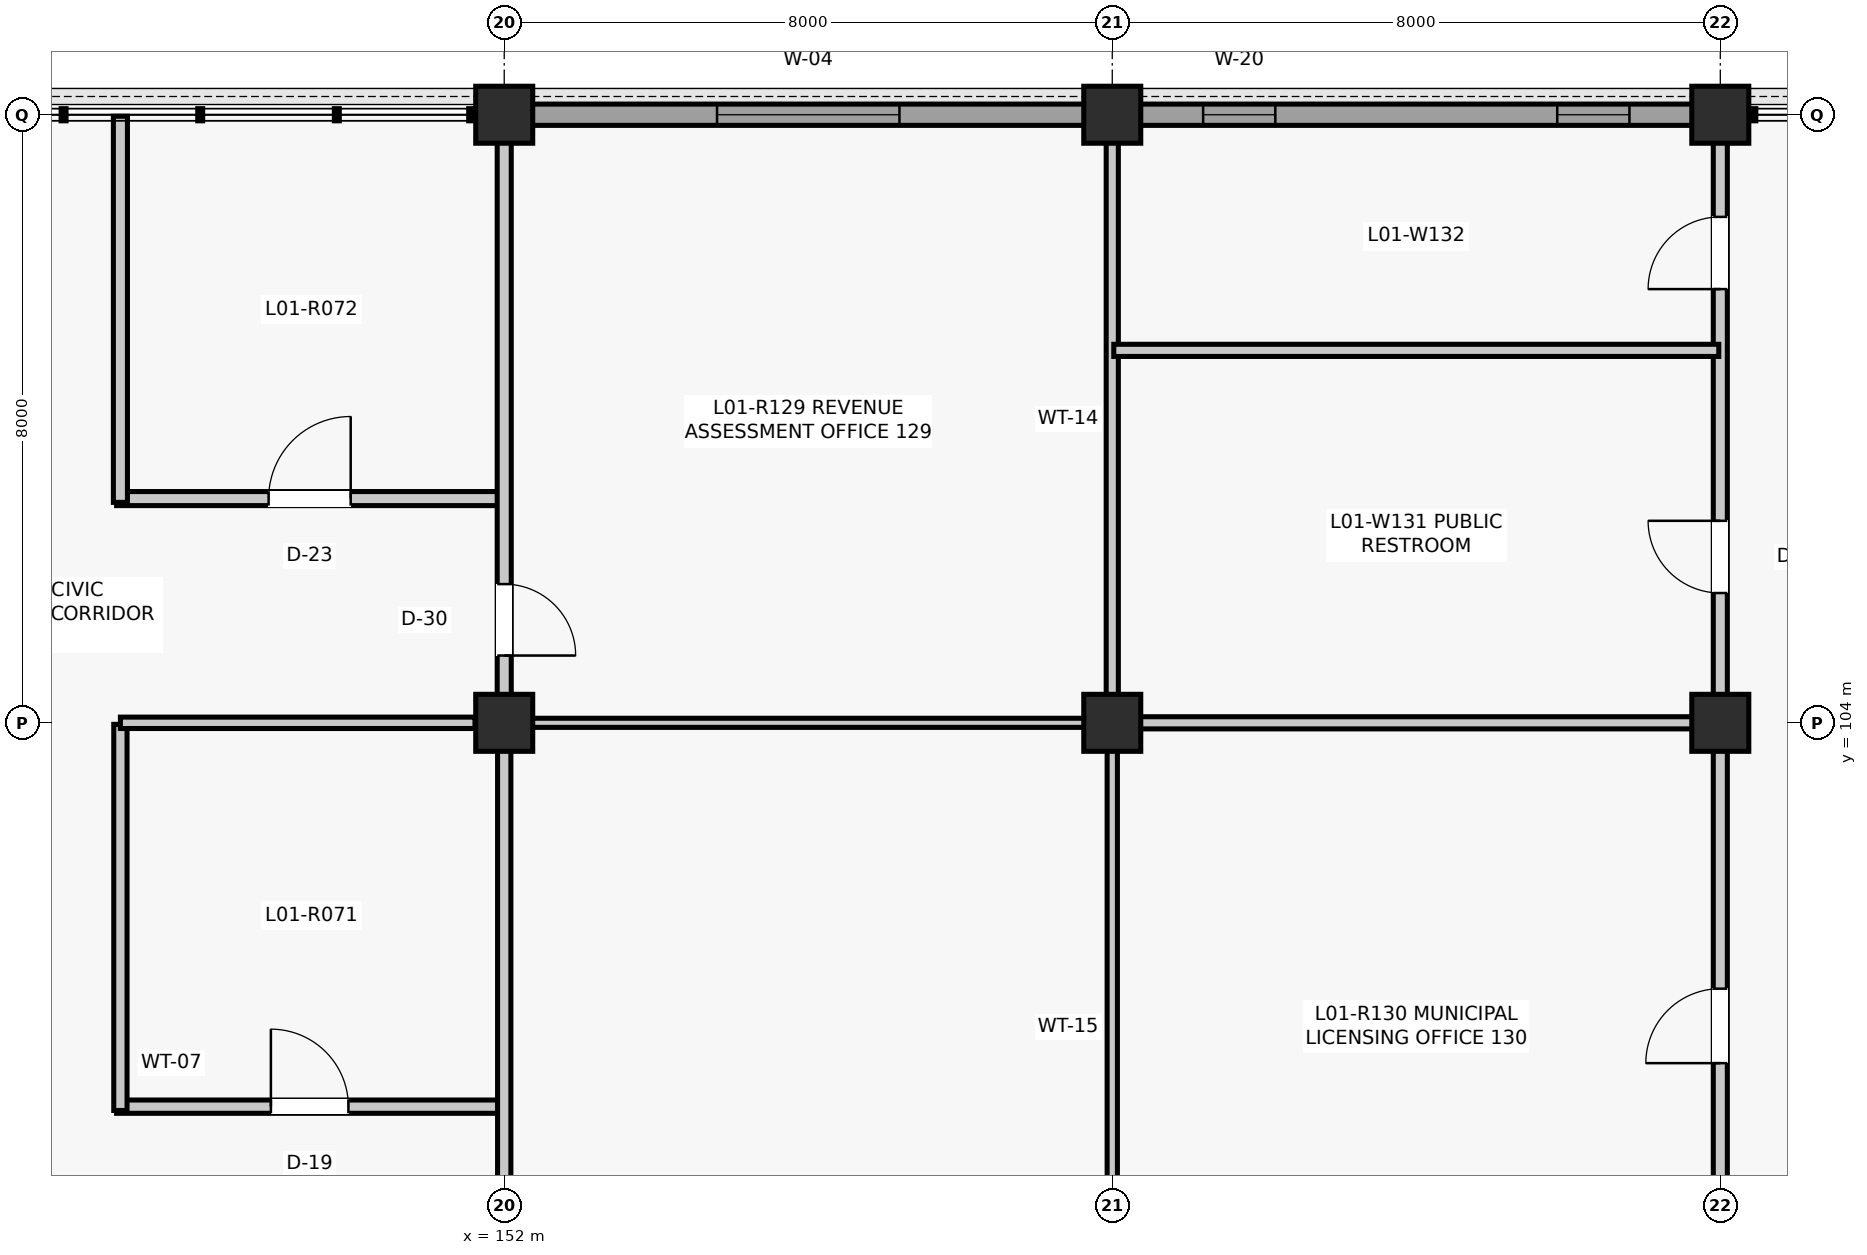
"""IFC4 building model, lengths in metres.
Left out: names, types, materials, properties, quantities, classifications, styles, units other than length and angle.
Written with IfcOpenShell. Run it as: python <this file> out.ifc"""

import sys

from ifc_helpers import new_model, si_unit, direction, frame, frame_2d, origin, origin_2d, place, context, subcontext, project, spatial, rectangle, extrude, element, fill, save


model = new_model("IFC4")
c1 = context("Model", 3, precision=1e-05, world=origin(), true_north=direction((0.0, 1.0)))
c2 = subcontext(c1, "Body", "Model", "MODEL_VIEW")
j1 = project(units=[si_unit("LENGTHUNIT", "METRE"), si_unit("PLANEANGLEUNIT", "RADIAN")], contexts=[c1])
p1 = place(None, origin())
s1 = spatial("IfcSite", under=j1, at=p1, CompositionType="ELEMENT")
p2 = place(p1, origin())
s2 = spatial("IfcBuilding", under=s1, at=p2, CompositionType="ELEMENT")
p3 = place(p2, frame((0.0, 0.0, 5.28)))
s3 = spatial("IfcBuildingStorey", under=s2, at=p3, CompositionType="ELEMENT", Elevation=5.28)
for number, where, z_axis, x_axis in (
    (1, (152.0, 104.0, 0.0), (0.0, 0.0, 1.0), (1.0, 0.0, 0.0)),
    (2, (152.0, 112.0, 0.0), (0.0, 0.0, 1.0), (1.0, 0.0, 0.0)),
    (3, (160.0, 104.0, 0.0), (0.0, 0.0, 1.0), (1.0, 0.0, 0.0)),
    (4, (160.0, 112.0, 0.0), (0.0, 0.0, 1.0), (1.0, 0.0, 0.0)),
    (5, (168.0, 104.0, 0.0), (0.0, 0.0, 1.0), (1.0, 0.0, 0.0)),
    (6, (168.0, 112.0, 0.0), (0.0, 0.0, 1.0), (1.0, 0.0, 0.0)),
):
    element("IfcColumn", number, at=place(p3, frame(where, z_axis=z_axis, x_axis=x_axis)), inside=s3, PredefinedType="COLUMN", context=c2, shape_type="SweptSolid", body=[
        extrude(rectangle(XDim=0.75, YDim=0.75, at=origin_2d()), origin(), (0.0, 0.0, 1.0), 4.62),
    ])
p4 = place(p3, frame((152.36, 112.0, 0.0), z_axis=(0.0, 0.0, 1.0), x_axis=(1.0, 0.0, 0.0)))
e7 = element("IfcWall", 7, at=p4, inside=s3, PredefinedType="SOLIDWALL", context=c2, shape_type="SweptSolid", body=[
    extrude(rectangle(XDim=7.28, YDim=0.28, at=frame_2d((3.64, 0.0))), origin(), (0.0, 0.0, 1.0), 3.914),
])
p5 = place(p4, frame((2.44, 0.0, 0.9)))
e8 = element("IfcOpeningElement", 8, at=p5, cuts=e7, PredefinedType="OPENING", context=c2, shape_type="SweptSolid", body=[
    extrude(rectangle(XDim=2.4, YDim=2.4, at=frame_2d((1.2, 1.2))), frame((0.0, 0.15, 0.0), z_axis=(0.0, -1.0, 0.0), x_axis=(1.0, 0.0, 0.0)), (0.0, 0.0, 1.0), 0.3),
])
p6 = place(p3, frame((160.36, 112.0, 0.0), z_axis=(0.0, 0.0, 1.0), x_axis=(1.0, 0.0, 0.0)))
e9 = element("IfcWall", 9, at=p6, inside=s3, PredefinedType="SOLIDWALL", context=c2, shape_type="SweptSolid", body=[
    extrude(rectangle(XDim=7.28, YDim=0.28, at=frame_2d((3.64, 0.0))), origin(), (0.0, 0.0, 1.0), 3.977),
])
p7 = place(p6, frame((0.835, 0.0, 1.2)))
e10 = element("IfcOpeningElement", 10, at=p7, cuts=e9, PredefinedType="OPENING", context=c2, shape_type="SweptSolid", body=[
    extrude(rectangle(XDim=0.95, YDim=1.4, at=frame_2d((0.475, 0.7))), frame((0.0, 0.15, 0.0), z_axis=(0.0, -1.0, 0.0), x_axis=(1.0, 0.0, 0.0)), (0.0, 0.0, 1.0), 0.3),
])
p8 = place(p6, frame((5.495, 0.0, 1.2)))
e11 = element("IfcOpeningElement", 11, at=p8, cuts=e9, PredefinedType="OPENING", context=c2, shape_type="SweptSolid", body=[
    extrude(rectangle(XDim=0.95, YDim=1.4, at=frame_2d((0.475, 0.7))), frame((0.0, 0.15, 0.0), z_axis=(0.0, -1.0, 0.0), x_axis=(1.0, 0.0, 0.0)), (0.0, 0.0, 1.0), 0.3),
])
p9 = place(p3, frame((146.9, 98.95, 0.0), z_axis=(0.0, 0.0, 1.0), x_axis=(1.0, 0.0, 0.0)))
e12 = element("IfcWall", 12, at=p9, inside=s3, PredefinedType="PARTITIONING", context=c2, shape_type="SweptSolid", body=[
    extrude(rectangle(XDim=5.08, YDim=0.175, at=frame_2d((2.54, 0.0))), origin(), (0.0, 0.0, 1.0), 3.851),
])
p10 = place(p9, frame((2.03, 0.0, 0.0)))
e13 = element("IfcOpeningElement", 13, at=p10, cuts=e12, PredefinedType="OPENING", context=c2, shape_type="SweptSolid", body=[
    extrude(rectangle(XDim=1.02, YDim=2.2, at=frame_2d((0.51, 1.1))), frame((0.0, 0.097, 0.0), z_axis=(0.0, -1.0, 0.0), x_axis=(1.0, 0.0, 0.0)), (0.0, 0.0, 1.0), 0.195),
])
p11 = place(p3, frame((146.95, 98.9, 0.0), z_axis=(0.0, 0.0, 1.0), x_axis=(0.0, 1.0, 0.0)))
e14 = element("IfcWall", 14, at=p11, inside=s3, PredefinedType="PARTITIONING", context=c2, shape_type="SweptSolid", body=[
    extrude(rectangle(XDim=5.08, YDim=0.175, at=frame_2d((2.54, 0.0))), origin(), (0.0, 0.0, 1.0), 3.781),
])
p12 = place(p3, frame((146.95, 104.0, 0.0), z_axis=(0.0, 0.0, 1.0), x_axis=(1.0, 0.0, 0.0)))
e15 = element("IfcWall", 15, at=p12, inside=s3, PredefinedType="PARTITIONING", context=c2, shape_type="SweptSolid", body=[
    extrude(rectangle(XDim=4.665, YDim=0.15, at=frame_2d((2.333, 0.0))), origin(), (0.0, 0.0, 1.0), 3.781),
])
p13 = place(p3, frame((146.9, 106.95, 0.0), z_axis=(0.0, 0.0, 1.0), x_axis=(1.0, 0.0, 0.0)))
e16 = element("IfcWall", 16, at=p13, inside=s3, PredefinedType="PARTITIONING", context=c2, shape_type="SweptSolid", body=[
    extrude(rectangle(XDim=5.08, YDim=0.185, at=frame_2d((2.54, 0.0))), origin(), (0.0, 0.0, 1.0), 3.787),
])
p14 = place(p13, frame((2.0, 0.0, 0.0)))
e17 = element("IfcOpeningElement", 17, at=p14, cuts=e16, PredefinedType="OPENING", context=c2, shape_type="SweptSolid", body=[
    extrude(rectangle(XDim=1.08, YDim=2.2, at=frame_2d((0.54, 1.1))), frame((0.0, 0.103, 0.0), z_axis=(0.0, -1.0, 0.0), x_axis=(1.0, 0.0, 0.0)), (0.0, 0.0, 1.0), 0.205),
])
p15 = place(p3, frame((146.95, 106.9, 0.0), z_axis=(0.0, 0.0, 1.0), x_axis=(0.0, 1.0, 0.0)))
e18 = element("IfcWall", 18, at=p15, inside=s3, PredefinedType="PARTITIONING", context=c2, shape_type="SweptSolid", body=[
    extrude(rectangle(XDim=5.08, YDim=0.185, at=frame_2d((2.54, 0.0))), origin(), (0.0, 0.0, 1.0), 3.968),
])
p16 = place(p3, frame((152.0, 96.365, 0.0), z_axis=(0.0, 0.0, 1.0), x_axis=(0.0, 1.0, 0.0)))
e19 = element("IfcWall", 19, at=p16, inside=s3, PredefinedType="PARTITIONING", context=c2, shape_type="SweptSolid", body=[
    extrude(rectangle(XDim=7.27, YDim=0.175, at=frame_2d((3.635, 0.0))), origin(), (0.0, 0.0, 1.0), 3.851),
])
p17 = place(p16, frame((0.52, 0.0, 0.0)))
e20 = element("IfcOpeningElement", 20, at=p17, cuts=e19, PredefinedType="OPENING", context=c2, shape_type="SweptSolid", body=[
    extrude(rectangle(XDim=0.94, YDim=2.12, at=frame_2d((0.47, 1.06))), frame((0.0, 0.097, 0.0), z_axis=(0.0, -1.0, 0.0), x_axis=(1.0, 0.0, 0.0)), (0.0, 0.0, 1.0), 0.195),
])
p18 = place(p3, frame((152.0, 104.365, 0.0), z_axis=(0.0, 0.0, 1.0), x_axis=(0.0, 1.0, 0.0)))
e21 = element("IfcWall", 21, at=p18, inside=s3, PredefinedType="PARTITIONING", context=c2, shape_type="SweptSolid", body=[
    extrude(rectangle(XDim=7.27, YDim=0.185, at=frame_2d((3.635, 0.0))), origin(), (0.0, 0.0, 1.0), 3.787),
])
p19 = place(p18, frame((0.52, 0.0, 0.0)))
e22 = element("IfcOpeningElement", 22, at=p19, cuts=e21, PredefinedType="OPENING", context=c2, shape_type="SweptSolid", body=[
    extrude(rectangle(XDim=0.94, YDim=2.12, at=frame_2d((0.47, 1.06))), frame((0.0, 0.103, 0.0), z_axis=(0.0, -1.0, 0.0), x_axis=(1.0, 0.0, 0.0)), (0.0, 0.0, 1.0), 0.205),
])
p20 = place(p3, frame((160.0, 96.39, 0.0), z_axis=(0.0, 0.0, 1.0), x_axis=(0.0, 1.0, 0.0)))
e23 = element("IfcWall", 23, at=p20, inside=s3, PredefinedType="PARTITIONING", context=c2, shape_type="SweptSolid", body=[
    extrude(rectangle(XDim=7.245, YDim=0.135, at=frame_2d((3.623, 0.0))), origin(), (0.0, 0.0, 1.0), 3.787),
])
p21 = place(p3, frame((152.365, 104.0, 0.0), z_axis=(0.0, 0.0, 1.0), x_axis=(1.0, 0.0, 0.0)))
e24 = element("IfcWall", 24, at=p21, inside=s3, PredefinedType="PARTITIONING", context=c2, shape_type="SweptSolid", body=[
    extrude(rectangle(XDim=7.27, YDim=0.12, at=frame_2d((3.635, 0.0))), origin(), (0.0, 0.0, 1.0), 3.712),
])
p22 = place(p3, frame((160.0, 104.365, 0.0), z_axis=(0.0, 0.0, 1.0), x_axis=(0.0, 1.0, 0.0)))
e25 = element("IfcWall", 25, at=p22, inside=s3, PredefinedType="PARTITIONING", context=c2, shape_type="SweptSolid", body=[
    extrude(rectangle(XDim=7.27, YDim=0.16, at=frame_2d((3.635, 0.0))), origin(), (0.0, 0.0, 1.0), 3.857),
])
p23 = place(p3, frame((168.0, 96.39, 0.0), z_axis=(0.0, 0.0, 1.0), x_axis=(0.0, 1.0, 0.0)))
e26 = element("IfcWall", 26, at=p23, inside=s3, PredefinedType="PARTITIONING", context=c2, shape_type="SweptSolid", body=[
    extrude(rectangle(XDim=7.245, YDim=0.185, at=frame_2d((3.623, 0.0))), origin(), (0.0, 0.0, 1.0), 3.857),
])
p24 = place(p23, frame((3.133, 0.0, 0.0)))
e27 = element("IfcOpeningElement", 27, at=p24, cuts=e26, PredefinedType="OPENING", context=c2, shape_type="SweptSolid", body=[
    extrude(rectangle(XDim=0.98, YDim=2.15, at=frame_2d((0.49, 1.075))), frame((0.0, 0.103, 0.0), z_axis=(0.0, -1.0, 0.0), x_axis=(1.0, 0.0, 0.0)), (0.0, 0.0, 1.0), 0.205),
])
p25 = place(p3, frame((160.365, 104.0, 0.0), z_axis=(0.0, 0.0, 1.0), x_axis=(1.0, 0.0, 0.0)))
e28 = element("IfcWall", 28, at=p25, inside=s3, PredefinedType="PARTITIONING", context=c2, shape_type="SweptSolid", body=[
    extrude(rectangle(XDim=7.27, YDim=0.16, at=frame_2d((3.635, 0.0))), origin(), (0.0, 0.0, 1.0), 3.787),
])
p26 = place(p3, frame((168.0, 104.365, 0.0), z_axis=(0.0, 0.0, 1.0), x_axis=(0.0, 1.0, 0.0)))
e29 = element("IfcWall", 29, at=p26, inside=s3, PredefinedType="PARTITIONING", context=c2, shape_type="SweptSolid", body=[
    extrude(rectangle(XDim=7.27, YDim=0.185, at=frame_2d((3.635, 0.0))), origin(), (0.0, 0.0, 1.0), 3.781),
])
p27 = place(p26, frame((1.343, 0.0, 0.0)))
e30 = element("IfcOpeningElement", 30, at=p27, cuts=e29, PredefinedType="OPENING", context=c2, shape_type="SweptSolid", body=[
    extrude(rectangle(XDim=0.95, YDim=2.1, at=frame_2d((0.475, 1.05))), frame((0.0, 0.103, 0.0), z_axis=(0.0, -1.0, 0.0), x_axis=(1.0, 0.0, 0.0)), (0.0, 0.0, 1.0), 0.205),
])
p28 = place(p26, frame((5.341, 0.0, 0.0)))
e31 = element("IfcOpeningElement", 31, at=p28, cuts=e29, PredefinedType="OPENING", context=c2, shape_type="SweptSolid", body=[
    extrude(rectangle(XDim=0.95, YDim=2.1, at=frame_2d((0.475, 1.05))), frame((0.0, 0.103, 0.0), z_axis=(0.0, -1.0, 0.0), x_axis=(1.0, 0.0, 0.0)), (0.0, 0.0, 1.0), 0.205),
])
p29 = place(p3, frame((160.02, 108.9, 0.0), z_axis=(0.0, 0.0, 1.0), x_axis=(1.0, 0.0, 0.0)))
e32 = element("IfcWall", 32, at=p29, inside=s3, PredefinedType="PARTITIONING", context=c2, shape_type="SweptSolid", body=[
    extrude(rectangle(XDim=7.96, YDim=0.16, at=frame_2d((3.98, 0.0))), origin(), (0.0, 0.0, 1.0), 3.781),
])
p30 = place(p5, origin())
e33 = element("IfcWindow", 33, at=p30, inside=s3, PartitioningType="SINGLE_PANEL", PredefinedType="WINDOW", context=c2, shape_type="SweptSolid", body=[
    extrude(rectangle(XDim=2.4, YDim=2.4, at=frame_2d((1.2, 1.2))), frame((0.0, 0.03, 0.0), z_axis=(0.0, -1.0, 0.0), x_axis=(1.0, 0.0, 0.0)), (0.0, 0.0, 1.0), 0.06),
])
fill(e8, e33)
p31 = place(p7, origin())
e34 = element("IfcWindow", 34, at=p31, inside=s3, PartitioningType="SINGLE_PANEL", PredefinedType="WINDOW", context=c2, shape_type="SweptSolid", body=[
    extrude(rectangle(XDim=0.95, YDim=1.4, at=frame_2d((0.475, 0.7))), frame((0.0, 0.03, 0.0), z_axis=(0.0, -1.0, 0.0), x_axis=(1.0, 0.0, 0.0)), (0.0, 0.0, 1.0), 0.06),
])
fill(e10, e34)
p32 = place(p8, origin())
e35 = element("IfcWindow", 35, at=p32, inside=s3, PartitioningType="SINGLE_PANEL", PredefinedType="WINDOW", context=c2, shape_type="SweptSolid", body=[
    extrude(rectangle(XDim=0.95, YDim=1.4, at=frame_2d((0.475, 0.7))), frame((0.0, 0.03, 0.0), z_axis=(0.0, -1.0, 0.0), x_axis=(1.0, 0.0, 0.0)), (0.0, 0.0, 1.0), 0.06),
])
fill(e11, e35)
p33 = place(p10, origin())
e36 = element("IfcDoor", 36, at=p33, inside=s3, OperationType="SINGLE_SWING_LEFT", PredefinedType="DOOR", context=c2, shape_type="SweptSolid", body=[
    extrude(rectangle(XDim=1.02, YDim=2.2, at=frame_2d((0.51, 1.1))), frame((0.0, 0.025, 0.0), z_axis=(0.0, -1.0, 0.0), x_axis=(1.0, 0.0, 0.0)), (0.0, 0.0, 1.0), 0.05),
])
fill(e13, e36)
p34 = place(p14, origin())
e37 = element("IfcDoor", 37, at=p34, inside=s3, OperationType="SINGLE_SWING_RIGHT", PredefinedType="DOOR", context=c2, shape_type="SweptSolid", body=[
    extrude(rectangle(XDim=1.08, YDim=2.2, at=frame_2d((0.54, 1.1))), frame((0.0, 0.025, 0.0), z_axis=(0.0, -1.0, 0.0), x_axis=(1.0, 0.0, 0.0)), (0.0, 0.0, 1.0), 0.05),
])
fill(e17, e37)
p35 = place(p19, frame((0.94, 0.0, 0.0), z_axis=(0.0, 0.0, 1.0), x_axis=(-1.0, 0.0, 0.0)))
e38 = element("IfcDoor", 38, at=p35, inside=s3, OperationType="SINGLE_SWING_LEFT", PredefinedType="DOOR", context=c2, shape_type="SweptSolid", body=[
    extrude(rectangle(XDim=0.94, YDim=2.12, at=frame_2d((0.47, 1.06))), frame((0.0, 0.025, 0.0), z_axis=(0.0, -1.0, 0.0), x_axis=(1.0, 0.0, 0.0)), (0.0, 0.0, 1.0), 0.05),
])
fill(e22, e38)
p36 = place(p24, origin())
e39 = element("IfcDoor", 39, at=p36, inside=s3, OperationType="SINGLE_SWING_LEFT", PredefinedType="DOOR", context=c2, shape_type="SweptSolid", body=[
    extrude(rectangle(XDim=0.98, YDim=2.15, at=frame_2d((0.49, 1.075))), frame((0.0, 0.025, 0.0), z_axis=(0.0, -1.0, 0.0), x_axis=(1.0, 0.0, 0.0)), (0.0, 0.0, 1.0), 0.05),
])
fill(e27, e39)
p37 = place(p27, origin())
e40 = element("IfcDoor", 40, at=p37, inside=s3, OperationType="SINGLE_SWING_RIGHT", PredefinedType="DOOR", context=c2, shape_type="SweptSolid", body=[
    extrude(rectangle(XDim=0.95, YDim=2.1, at=frame_2d((0.475, 1.05))), frame((0.0, 0.025, 0.0), z_axis=(0.0, -1.0, 0.0), x_axis=(1.0, 0.0, 0.0)), (0.0, 0.0, 1.0), 0.05),
])
fill(e30, e40)
p38 = place(p28, origin())
e41 = element("IfcDoor", 41, at=p38, inside=s3, OperationType="SINGLE_SWING_LEFT", PredefinedType="DOOR", context=c2, shape_type="SweptSolid", body=[
    extrude(rectangle(XDim=0.95, YDim=2.1, at=frame_2d((0.475, 1.05))), frame((0.0, 0.025, 0.0), z_axis=(0.0, -1.0, 0.0), x_axis=(1.0, 0.0, 0.0)), (0.0, 0.0, 1.0), 0.05),
])
fill(e31, e41)
save(model, sys.argv[1])
